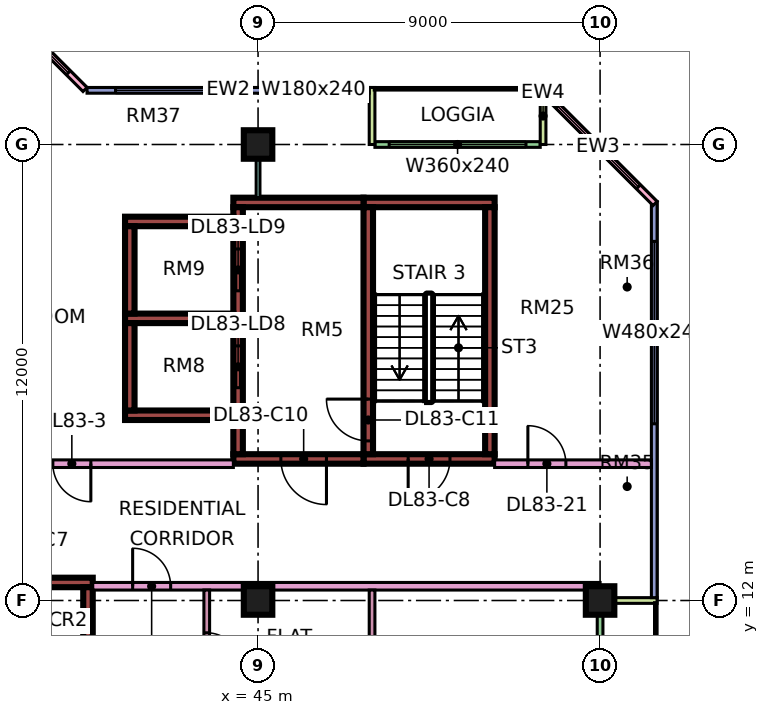
"""IFC4 building model, lengths in metres.
Left out: names, types, materials, properties, quantities, classifications, styles, units other than length and angle.
Written with IfcOpenShell. Run it as: python <this file> out.ifc"""

import sys

from ifc_helpers import new_model, si_unit, direction, frame, frame_2d, origin, origin_2d, place, context, subcontext, project, spatial, rectangle, extrude, element, fill, save


model = new_model("IFC4")
c1 = context("Model", 3, precision=1e-05, world=origin(), true_north=direction((0.0, 1.0)))
c2 = subcontext(c1, "Body", "Model", "MODEL_VIEW")
j1 = project(units=[si_unit("LENGTHUNIT", "METRE"), si_unit("PLANEANGLEUNIT", "RADIAN")], contexts=[c1])
p1 = place(None, origin())
s1 = spatial("IfcSite", under=j1, at=p1, CompositionType="ELEMENT")
p2 = place(p1, origin())
s2 = spatial("IfcBuilding", under=s1, at=p2, CompositionType="ELEMENT")
p3 = place(p2, frame((0.0, 0.0, 357.65)))
s3 = spatial("IfcBuildingStorey", under=s2, at=p3, CompositionType="ELEMENT", Elevation=357.65)
for number, where, z_axis, x_axis in (
    (1, (45.0, 12.0, 0.0), (0.0, 0.0, 1.0), (1.0, 0.0, 0.0)),
    (2, (45.0, 24.0, 0.0), (0.0, 0.0, 1.0), (1.0, 0.0, 0.0)),
    (3, (54.0, 12.0, 0.0), (0.0, 0.0, 1.0), (1.0, 0.0, 0.0)),
):
    element("IfcColumn", number, at=place(p3, frame(where, z_axis=z_axis, x_axis=x_axis)), inside=s3, PredefinedType="COLUMN", context=c2, shape_type="SweptSolid", body=[
        extrude(rectangle(XDim=0.75, YDim=0.75, at=origin_2d()), origin(), (0.0, 0.0, 1.0), 3.75),
    ])
p4 = place(p3, frame((36.375, 12.475, 0.0), z_axis=(0.0, 0.0, 1.0), x_axis=(1.0, 0.0, 0.0)))
e4 = element("IfcWall", 4, at=p4, inside=s3, PredefinedType="SHEAR", context=c2, shape_type="SweptSolid", body=[
    extrude(rectangle(XDim=4.275, YDim=0.25, at=frame_2d((2.137, 0.0))), origin(), (0.0, 0.0, 1.0), 3.75),
])
p5 = place(p4, frame((2.0, 0.0, 0.0)))
e5 = element("IfcOpeningElement", 5, at=p5, cuts=e4, PredefinedType="OPENING", context=c2, shape_type="SweptSolid", body=[
    extrude(rectangle(XDim=1.1, YDim=2.2, at=frame_2d((0.55, 1.1))), frame((0.0, 0.135, 0.0), z_axis=(0.0, -1.0, 0.0), x_axis=(1.0, 0.0, 0.0)), (0.0, 0.0, 1.0), 0.27),
])
p6 = place(p3, frame((40.525, 5.85, 0.0), z_axis=(0.0, 0.0, 1.0), x_axis=(0.0, 1.0, 0.0)))
e6 = element("IfcWall", 6, at=p6, inside=s3, PredefinedType="SHEAR", context=c2, shape_type="SweptSolid", body=[
    extrude(rectangle(XDim=6.5, YDim=0.25, at=frame_2d((3.25, 0.0))), origin(), (0.0, 0.0, 1.0), 3.75),
])
p7 = place(p3, frame((47.775, 15.725, 0.0), z_axis=(0.0, 0.0, 1.0), x_axis=(1.0, 0.0, 0.0)))
e7 = element("IfcWall", 7, at=p7, inside=s3, PredefinedType="SHEAR", context=c2, shape_type="SweptSolid", body=[
    extrude(rectangle(XDim=3.45, YDim=0.25, at=frame_2d((1.725, 0.0))), origin(), (0.0, 0.0, 1.0), 3.75),
])
p8 = place(p7, frame((1.175, 0.0, 0.0)))
e8 = element("IfcOpeningElement", 8, at=p8, cuts=e7, PredefinedType="OPENING", context=c2, shape_type="SweptSolid", body=[
    extrude(rectangle(XDim=1.1, YDim=2.2, at=frame_2d((0.55, 1.1))), frame((0.0, 0.135, 0.0), z_axis=(0.0, -1.0, 0.0), x_axis=(1.0, 0.0, 0.0)), (0.0, 0.0, 1.0), 0.27),
])
p9 = place(p3, frame((47.775, 22.475, 0.0), z_axis=(0.0, 0.0, 1.0), x_axis=(1.0, 0.0, 0.0)))
e9 = element("IfcWall", 9, at=p9, inside=s3, PredefinedType="SHEAR", context=c2, shape_type="SweptSolid", body=[
    extrude(rectangle(XDim=3.45, YDim=0.25, at=frame_2d((1.725, 0.0))), origin(), (0.0, 0.0, 1.0), 3.75),
])
p10 = place(p3, frame((47.9, 15.85, 0.0), z_axis=(0.0, 0.0, 1.0), x_axis=(0.0, 1.0, 0.0)))
e10 = element("IfcWall", 10, at=p10, inside=s3, PredefinedType="SHEAR", context=c2, shape_type="SweptSolid", body=[
    extrude(rectangle(XDim=6.5, YDim=0.25, at=frame_2d((3.25, 0.0))), origin(), (0.0, 0.0, 1.0), 3.75),
])
p11 = place(p10, frame((0.35, 0.0, 0.0)))
e11 = element("IfcOpeningElement", 11, at=p11, cuts=e10, PredefinedType="OPENING", context=c2, shape_type="SweptSolid", body=[
    extrude(rectangle(XDim=1.1, YDim=2.2, at=frame_2d((0.55, 1.1))), frame((0.0, 0.135, 0.0), z_axis=(0.0, -1.0, 0.0), x_axis=(1.0, 0.0, 0.0)), (0.0, 0.0, 1.0), 0.27),
])
p12 = place(p3, frame((51.1, 15.85, 0.0), z_axis=(0.0, 0.0, 1.0), x_axis=(0.0, 1.0, 0.0)))
e12 = element("IfcWall", 12, at=p12, inside=s3, PredefinedType="SHEAR", context=c2, shape_type="SweptSolid", body=[
    extrude(rectangle(XDim=6.5, YDim=0.25, at=frame_2d((3.25, 0.0))), origin(), (0.0, 0.0, 1.0), 3.75),
])
p13 = place(p3, frame((44.35, 15.725, 0.0), z_axis=(0.0, 0.0, 1.0), x_axis=(1.0, 0.0, 0.0)))
e13 = element("IfcWall", 13, at=p13, inside=s3, PredefinedType="SHEAR", context=c2, shape_type="SweptSolid", body=[
    extrude(rectangle(XDim=3.425, YDim=0.25, at=frame_2d((1.712, 0.0))), origin(), (0.0, 0.0, 1.0), 3.75),
])
p14 = place(p13, frame((1.25, 0.0, 0.0)))
e14 = element("IfcOpeningElement", 14, at=p14, cuts=e13, PredefinedType="OPENING", context=c2, shape_type="SweptSolid", body=[
    extrude(rectangle(XDim=1.2, YDim=2.2, at=frame_2d((0.6, 1.1))), frame((0.0, 0.135, 0.0), z_axis=(0.0, -1.0, 0.0), x_axis=(1.0, 0.0, 0.0)), (0.0, 0.0, 1.0), 0.27),
])
p15 = place(p3, frame((44.35, 22.475, 0.0), z_axis=(0.0, 0.0, 1.0), x_axis=(1.0, 0.0, 0.0)))
e15 = element("IfcWall", 15, at=p15, inside=s3, PredefinedType="SHEAR", context=c2, shape_type="SweptSolid", body=[
    extrude(rectangle(XDim=3.425, YDim=0.25, at=frame_2d((1.712, 0.0))), origin(), (0.0, 0.0, 1.0), 3.75),
])
p16 = place(p3, frame((44.475, 15.85, 0.0), z_axis=(0.0, 0.0, 1.0), x_axis=(0.0, 1.0, 0.0)))
e16 = element("IfcWall", 16, at=p16, inside=s3, PredefinedType="SHEAR", context=c2, shape_type="SweptSolid", body=[
    extrude(rectangle(XDim=6.5, YDim=0.25, at=frame_2d((3.25, 0.0))), origin(), (0.0, 0.0, 1.0), 3.75),
])
p17 = place(p16, frame((1.75, 0.0, 0.0)))
e17 = element("IfcOpeningElement", 17, at=p17, cuts=e16, PredefinedType="OPENING", context=c2, shape_type="SweptSolid", body=[
    extrude(rectangle(XDim=1.1, YDim=2.2, at=frame_2d((0.55, 1.1))), frame((0.0, 0.135, 0.0), z_axis=(0.0, -1.0, 0.0), x_axis=(1.0, 0.0, 0.0)), (0.0, 0.0, 1.0), 0.27),
])
p18 = place(p16, frame((4.3, 0.0, 0.0)))
e18 = element("IfcOpeningElement", 18, at=p18, cuts=e16, PredefinedType="OPENING", context=c2, shape_type="SweptSolid", body=[
    extrude(rectangle(XDim=1.1, YDim=2.2, at=frame_2d((0.55, 1.1))), frame((0.0, 0.135, 0.0), z_axis=(0.0, -1.0, 0.0), x_axis=(1.0, 0.0, 0.0)), (0.0, 0.0, 1.0), 0.27),
])
for number, where, z_axis, x_axis in (
    (19, (41.5, 16.875, 0.0), (0.0, 0.0, 1.0), (1.0, 0.0, 0.0)),
    (20, (41.5, 19.425, 0.0), (0.0, 0.0, 1.0), (1.0, 0.0, 0.0)),
    (21, (41.5, 21.975, 0.0), (0.0, 0.0, 1.0), (1.0, 0.0, 0.0)),
):
    element("IfcWall", number, at=place(p3, frame(where, z_axis=z_axis, x_axis=x_axis)), inside=s3, PredefinedType="SHEAR", context=c2, shape_type="SweptSolid", body=[
        extrude(rectangle(XDim=2.85, YDim=0.25, at=frame_2d((1.425, 0.0))), origin(), (0.0, 0.0, 1.0), 3.75),
    ])
for number, where, z_axis, x_axis in (
    (22, (41.625, 17.0, 0.0), (0.0, 0.0, 1.0), (0.0, 1.0, 0.0)),
    (23, (41.625, 19.55, 0.0), (0.0, 0.0, 1.0), (0.0, 1.0, 0.0)),
):
    element("IfcWall", number, at=place(p3, frame(where, z_axis=z_axis, x_axis=x_axis)), inside=s3, PredefinedType="SHEAR", context=c2, shape_type="SweptSolid", body=[
        extrude(rectangle(XDim=2.3, YDim=0.25, at=frame_2d((1.15, 0.0))), origin(), (0.0, 0.0, 1.0), 3.75),
    ])
p19 = place(p3, frame((52.425, 24.0, 0.0), z_axis=(0.0, 0.0, 1.0), x_axis=(-1.0, 0.0, 0.0)))
e24 = element("IfcWall", 24, at=p19, inside=s3, PredefinedType="SOLIDWALL", context=c2, shape_type="SweptSolid", body=[
    extrude(rectangle(XDim=4.35, YDim=0.15, at=frame_2d((2.175, 0.0))), origin(), (0.0, 0.0, 1.0), 3.35),
])
p20 = place(p19, frame((0.375, 0.0, 0.45)))
e25 = element("IfcOpeningElement", 25, at=p20, cuts=e24, PredefinedType="OPENING", context=c2, shape_type="SweptSolid", body=[
    extrude(rectangle(XDim=3.6, YDim=2.4, at=frame_2d((1.8, 1.2))), frame((0.0, 0.085, 0.0), z_axis=(0.0, -1.0, 0.0), x_axis=(1.0, 0.0, 0.0)), (0.0, 0.0, 1.0), 0.17),
])
for number, where, z_axis, x_axis in (
    (26, (52.5, 25.5, 0.0), (0.0, 0.0, 1.0), (0.0, -1.0, 0.0)),
    (27, (48.0, 25.5, 0.0), (0.0, 0.0, 1.0), (0.0, -1.0, 0.0)),
):
    element("IfcWall", number, at=place(p3, frame(where, z_axis=z_axis, x_axis=x_axis)), inside=s3, PredefinedType="SOLIDWALL", context=c2, shape_type="SweptSolid", body=[
        extrude(rectangle(XDim=1.5, YDim=0.15, at=frame_2d((0.75, 0.0))), origin(), (0.0, 0.0, 1.0), 3.35),
    ])
p21 = place(p3, frame((47.925, 25.425, 0.0), z_axis=(0.0, 0.0, 1.0), x_axis=(-1.0, 0.0, 0.0)))
e28 = element("IfcWall", 28, at=p21, inside=s3, PredefinedType="SOLIDWALL", context=c2, shape_type="SweptSolid", body=[
    extrude(rectangle(XDim=7.425, YDim=0.15, at=frame_2d((3.712, 0.0))), origin(), (0.0, 0.0, 1.0), 3.35),
])
p22 = place(p21, frame((0.562, 0.0, 0.45)))
e29 = element("IfcOpeningElement", 29, at=p22, cuts=e28, PredefinedType="OPENING", context=c2, shape_type="SweptSolid", body=[
    extrude(rectangle(XDim=1.8, YDim=2.4, at=frame_2d((0.9, 1.2))), frame((0.0, 0.085, 0.0), z_axis=(0.0, -1.0, 0.0), x_axis=(1.0, 0.0, 0.0)), (0.0, 0.0, 1.0), 0.17),
])
p23 = place(p21, frame((3.675, 0.0, 0.45)))
e30 = element("IfcOpeningElement", 30, at=p23, cuts=e28, PredefinedType="OPENING", context=c2, shape_type="SweptSolid", body=[
    extrude(rectangle(XDim=3.0, YDim=2.4, at=frame_2d((1.5, 1.2))), frame((0.0, 0.085, 0.0), z_axis=(0.0, -1.0, 0.0), x_axis=(1.0, 0.0, 0.0)), (0.0, 0.0, 1.0), 0.17),
])
p24 = place(p3, frame((40.447, 25.447, 0.0), z_axis=(0.0, 0.0, 1.0), x_axis=(-0.707106781187, 0.707106781187, 0.0)))
e31 = element("IfcWall", 31, at=p24, inside=s3, PredefinedType="SOLIDWALL", context=c2, shape_type="SweptSolid", body=[
    extrude(rectangle(XDim=4.243, YDim=0.15, at=frame_2d((2.121, 0.0))), origin(), (0.0, 0.0, 1.0), 3.35),
])
p25 = place(p24, frame((0.621, 0.0, 0.45)))
e32 = element("IfcOpeningElement", 32, at=p25, cuts=e31, PredefinedType="OPENING", context=c2, shape_type="SweptSolid", body=[
    extrude(rectangle(XDim=3.0, YDim=2.4, at=frame_2d((1.5, 1.2))), frame((0.0, 0.085, 0.0), z_axis=(0.0, -1.0, 0.0), x_axis=(1.0, 0.0, 0.0)), (0.0, 0.0, 1.0), 0.17),
])
p26 = place(p3, frame((54.0, 1.575, 0.0), z_axis=(0.0, 0.0, 1.0), x_axis=(0.0, 1.0, 0.0)))
e33 = element("IfcWall", 33, at=p26, inside=s3, PredefinedType="SOLIDWALL", context=c2, shape_type="SweptSolid", body=[
    extrude(rectangle(XDim=10.35, YDim=0.15, at=frame_2d((5.175, 0.0))), origin(), (0.0, 0.0, 1.0), 3.35),
])
p27 = place(p26, frame((0.663, 0.0, 0.0)))
e34 = element("IfcOpeningElement", 34, at=p27, cuts=e33, PredefinedType="OPENING", context=c2, shape_type="SweptSolid", body=[
    extrude(rectangle(XDim=1.8, YDim=2.4, at=frame_2d((0.9, 1.2))), frame((0.0, 0.085, 0.0), z_axis=(0.0, -1.0, 0.0), x_axis=(1.0, 0.0, 0.0)), (0.0, 0.0, 1.0), 0.17),
])
p28 = place(p26, frame((5.637, 0.0, 0.45)))
e35 = element("IfcOpeningElement", 35, at=p28, cuts=e33, PredefinedType="OPENING", context=c2, shape_type="SweptSolid", body=[
    extrude(rectangle(XDim=3.0, YDim=2.4, at=frame_2d((1.5, 1.2))), frame((0.0, 0.085, 0.0), z_axis=(0.0, -1.0, 0.0), x_axis=(1.0, 0.0, 0.0)), (0.0, 0.0, 1.0), 0.17),
])
p29 = place(p3, frame((55.5, 12.0, 0.0), z_axis=(0.0, 0.0, 1.0), x_axis=(-1.0, 0.0, 0.0)))
e36 = element("IfcWall", 36, at=p29, inside=s3, PredefinedType="SOLIDWALL", context=c2, shape_type="SweptSolid", body=[
    extrude(rectangle(XDim=1.5, YDim=0.15, at=frame_2d((0.75, 0.0))), origin(), (0.0, 0.0, 1.0), 3.35),
])
p30 = place(p3, frame((55.425, 12.075, 0.0), z_axis=(0.0, 0.0, 1.0), x_axis=(0.0, 1.0, 0.0)))
e37 = element("IfcWall", 37, at=p30, inside=s3, PredefinedType="SOLIDWALL", context=c2, shape_type="SweptSolid", body=[
    extrude(rectangle(XDim=10.425, YDim=0.15, at=frame_2d((5.212, 0.0))), origin(), (0.0, 0.0, 1.0), 3.35),
])
p31 = place(p30, frame((4.575, 0.0, 0.45)))
e38 = element("IfcOpeningElement", 38, at=p31, cuts=e37, PredefinedType="OPENING", context=c2, shape_type="SweptSolid", body=[
    extrude(rectangle(XDim=4.8, YDim=2.4, at=frame_2d((2.4, 1.2))), frame((0.0, 0.085, 0.0), z_axis=(0.0, -1.0, 0.0), x_axis=(1.0, 0.0, 0.0)), (0.0, 0.0, 1.0), 0.17),
])
p32 = place(p3, frame((55.447, 22.447, 0.0), z_axis=(0.0, 0.0, 1.0), x_axis=(-0.707106781187, 0.707106781187, 0.0)))
e39 = element("IfcWall", 39, at=p32, inside=s3, PredefinedType="SOLIDWALL", context=c2, shape_type="SweptSolid", body=[
    extrude(rectangle(XDim=4.243, YDim=0.15, at=frame_2d((2.121, 0.0))), origin(), (0.0, 0.0, 1.0), 3.35),
])
p33 = place(p32, frame((0.621, 0.0, 0.45)))
e40 = element("IfcOpeningElement", 40, at=p33, cuts=e39, PredefinedType="OPENING", context=c2, shape_type="SweptSolid", body=[
    extrude(rectangle(XDim=3.0, YDim=2.4, at=frame_2d((1.5, 1.2))), frame((0.0, 0.085, 0.0), z_axis=(0.0, -1.0, 0.0), x_axis=(1.0, 0.0, 0.0)), (0.0, 0.0, 1.0), 0.17),
])
p34 = place(p3, frame((34.0, 15.6, 0.0), z_axis=(0.0, 0.0, 1.0), x_axis=(1.0, 0.0, 0.0)))
e41 = element("IfcWall", 41, at=p34, inside=s3, PredefinedType="PARTITIONING", context=c2, shape_type="SweptSolid", body=[
    extrude(rectangle(XDim=10.35, YDim=0.2, at=frame_2d((5.175, 0.0))), origin(), (0.0, 0.0, 1.0), 3.35),
])
p35 = place(p34, frame((5.6, 0.0, 0.0)))
e42 = element("IfcOpeningElement", 42, at=p35, cuts=e41, PredefinedType="OPENING", context=c2, shape_type="SweptSolid", body=[
    extrude(rectangle(XDim=1.0, YDim=2.1, at=frame_2d((0.5, 1.05))), frame((0.0, 0.11, 0.0), z_axis=(0.0, -1.0, 0.0), x_axis=(1.0, 0.0, 0.0)), (0.0, 0.0, 1.0), 0.22),
])
p36 = place(p34, frame((0.45, 0.0, 0.0)))
e43 = element("IfcOpeningElement", 43, at=p36, cuts=e41, PredefinedType="OPENING", context=c2, shape_type="SweptSolid", body=[
    extrude(rectangle(XDim=1.2, YDim=2.1, at=frame_2d((0.6, 1.05))), frame((0.0, 0.11, 0.0), z_axis=(0.0, -1.0, 0.0), x_axis=(1.0, 0.0, 0.0)), (0.0, 0.0, 1.0), 0.22),
])
p37 = place(p3, frame((40.65, 12.375, 0.0), z_axis=(0.0, 0.0, 1.0), x_axis=(1.0, 0.0, 0.0)))
e44 = element("IfcWall", 44, at=p37, inside=s3, PredefinedType="PARTITIONING", context=c2, shape_type="SweptSolid", body=[
    extrude(rectangle(XDim=13.35, YDim=0.2, at=frame_2d((6.675, 0.0))), origin(), (0.0, 0.0, 1.0), 3.35),
])
p38 = place(p37, frame((1.05, 0.0, 0.0)))
e45 = element("IfcOpeningElement", 45, at=p38, cuts=e44, PredefinedType="OPENING", context=c2, shape_type="SweptSolid", body=[
    extrude(rectangle(XDim=1.0, YDim=2.1, at=frame_2d((0.5, 1.05))), frame((0.0, 0.11, 0.0), z_axis=(0.0, -1.0, 0.0), x_axis=(1.0, 0.0, 0.0)), (0.0, 0.0, 1.0), 0.22),
])
p39 = place(p3, frame((43.65, 5.975, 0.0), z_axis=(0.0, 0.0, 1.0), x_axis=(0.0, 1.0, 0.0)))
e46 = element("IfcWall", 46, at=p39, inside=s3, PredefinedType="PARTITIONING", context=c2, shape_type="SweptSolid", body=[
    extrude(rectangle(XDim=6.3, YDim=0.15, at=frame_2d((3.15, 0.0))), origin(), (0.0, 0.0, 1.0), 3.35),
])
p40 = place(p39, frame((4.275, 0.0, 0.0)))
e47 = element("IfcOpeningElement", 47, at=p40, cuts=e46, PredefinedType="OPENING", context=c2, shape_type="SweptSolid", body=[
    extrude(rectangle(XDim=0.9, YDim=2.1, at=frame_2d((0.45, 1.05))), frame((0.0, 0.085, 0.0), z_axis=(0.0, -1.0, 0.0), x_axis=(1.0, 0.0, 0.0)), (0.0, 0.0, 1.0), 0.17),
])
p41 = place(p3, frame((45.0, 22.6, 0.0), z_axis=(0.0, 0.0, 1.0), x_axis=(0.0, 1.0, 0.0)))
e48 = element("IfcWall", 48, at=p41, inside=s3, PredefinedType="PARTITIONING", context=c2, shape_type="SweptSolid", body=[
    extrude(rectangle(XDim=1.4, YDim=0.1, at=frame_2d((0.7, 0.0))), origin(), (0.0, 0.0, 1.0), 3.35),
])
p42 = place(p3, frame((48.0, 5.975, 0.0), z_axis=(0.0, 0.0, 1.0), x_axis=(0.0, 1.0, 0.0)))
e49 = element("IfcWall", 49, at=p42, inside=s3, PredefinedType="PARTITIONING", context=c2, shape_type="SweptSolid", body=[
    extrude(rectangle(XDim=6.3, YDim=0.15, at=frame_2d((3.15, 0.0))), origin(), (0.0, 0.0, 1.0), 3.35),
])
p43 = place(p3, frame((51.225, 15.6, 0.0), z_axis=(0.0, 0.0, 1.0), x_axis=(1.0, 0.0, 0.0)))
e50 = element("IfcWall", 50, at=p43, inside=s3, PredefinedType="PARTITIONING", context=c2, shape_type="SweptSolid", body=[
    extrude(rectangle(XDim=4.125, YDim=0.2, at=frame_2d((2.062, 0.0))), origin(), (0.0, 0.0, 1.0), 3.35),
])
p44 = place(p43, frame((0.875, 0.0, 0.0)))
e51 = element("IfcOpeningElement", 51, at=p44, cuts=e50, PredefinedType="OPENING", context=c2, shape_type="SweptSolid", body=[
    extrude(rectangle(XDim=1.0, YDim=2.1, at=frame_2d((0.5, 1.05))), frame((0.0, 0.11, 0.0), z_axis=(0.0, -1.0, 0.0), x_axis=(1.0, 0.0, 0.0)), (0.0, 0.0, 1.0), 0.22),
])
p45 = place(p20, origin())
e52 = element("IfcWindow", 52, at=p45, inside=s3, PartitioningType="SINGLE_PANEL", PredefinedType="WINDOW", context=c2, shape_type="SweptSolid", body=[
    extrude(rectangle(XDim=3.6, YDim=2.4, at=frame_2d((1.8, 1.2))), frame((0.0, 0.03, 0.0), z_axis=(0.0, -1.0, 0.0), x_axis=(1.0, 0.0, 0.0)), (0.0, 0.0, 1.0), 0.06),
])
fill(e25, e52)
p46 = place(p22, origin())
e53 = element("IfcWindow", 53, at=p46, inside=s3, PartitioningType="SINGLE_PANEL", PredefinedType="WINDOW", context=c2, shape_type="SweptSolid", body=[
    extrude(rectangle(XDim=1.8, YDim=2.4, at=frame_2d((0.9, 1.2))), frame((0.0, 0.03, 0.0), z_axis=(0.0, -1.0, 0.0), x_axis=(1.0, 0.0, 0.0)), (0.0, 0.0, 1.0), 0.06),
])
fill(e29, e53)
p47 = place(p23, origin())
e54 = element("IfcWindow", 54, at=p47, inside=s3, PartitioningType="SINGLE_PANEL", PredefinedType="WINDOW", context=c2, shape_type="SweptSolid", body=[
    extrude(rectangle(XDim=3.0, YDim=2.4, at=frame_2d((1.5, 1.2))), frame((0.0, 0.03, 0.0), z_axis=(0.0, -1.0, 0.0), x_axis=(1.0, 0.0, 0.0)), (0.0, 0.0, 1.0), 0.06),
])
fill(e30, e54)
p48 = place(p25, origin())
e55 = element("IfcWindow", 55, at=p48, inside=s3, PartitioningType="SINGLE_PANEL", PredefinedType="WINDOW", context=c2, shape_type="SweptSolid", body=[
    extrude(rectangle(XDim=3.0, YDim=2.4, at=frame_2d((1.5, 1.2))), frame((0.0, 0.03, 0.0), z_axis=(0.0, -1.0, 0.0), x_axis=(1.0, 0.0, 0.0)), (0.0, 0.0, 1.0), 0.06),
])
fill(e32, e55)
p49 = place(p31, origin())
e56 = element("IfcWindow", 56, at=p49, inside=s3, PartitioningType="SINGLE_PANEL", PredefinedType="WINDOW", context=c2, shape_type="SweptSolid", body=[
    extrude(rectangle(XDim=4.8, YDim=2.4, at=frame_2d((2.4, 1.2))), frame((0.0, 0.03, 0.0), z_axis=(0.0, -1.0, 0.0), x_axis=(1.0, 0.0, 0.0)), (0.0, 0.0, 1.0), 0.06),
])
fill(e38, e56)
p50 = place(p33, origin())
e57 = element("IfcWindow", 57, at=p50, inside=s3, PartitioningType="SINGLE_PANEL", PredefinedType="WINDOW", context=c2, shape_type="SweptSolid", body=[
    extrude(rectangle(XDim=3.0, YDim=2.4, at=frame_2d((1.5, 1.2))), frame((0.0, 0.03, 0.0), z_axis=(0.0, -1.0, 0.0), x_axis=(1.0, 0.0, 0.0)), (0.0, 0.0, 1.0), 0.06),
])
fill(e40, e57)
p51 = place(p8, frame((1.1, 0.0, 0.0), z_axis=(0.0, 0.0, 1.0), x_axis=(-1.0, 0.0, 0.0)))
e58 = element("IfcDoor", 58, at=p51, inside=s3, OperationType="SINGLE_SWING_LEFT", PredefinedType="DOOR", context=c2, shape_type="SweptSolid", body=[
    extrude(rectangle(XDim=1.1, YDim=2.2, at=frame_2d((0.55, 1.1))), frame((0.0, 0.025, 0.0), z_axis=(0.0, -1.0, 0.0), x_axis=(1.0, 0.0, 0.0)), (0.0, 0.0, 1.0), 0.05),
])
fill(e8, e58)
p52 = place(p14, origin())
e59 = element("IfcDoor", 59, at=p52, inside=s3, OperationType="SINGLE_SWING_RIGHT", PredefinedType="DOOR", context=c2, shape_type="SweptSolid", body=[
    extrude(rectangle(XDim=1.2, YDim=2.2, at=frame_2d((0.6, 1.1))), frame((0.0, 0.025, 0.0), z_axis=(0.0, -1.0, 0.0), x_axis=(1.0, 0.0, 0.0)), (0.0, 0.0, 1.0), 0.05),
])
fill(e14, e59)
p53 = place(p11, frame((1.1, 0.0, 0.0), z_axis=(0.0, 0.0, 1.0), x_axis=(-1.0, 0.0, 0.0)))
e60 = element("IfcDoor", 60, at=p53, inside=s3, OperationType="SINGLE_SWING_RIGHT", PredefinedType="DOOR", context=c2, shape_type="SweptSolid", body=[
    extrude(rectangle(XDim=1.1, YDim=2.2, at=frame_2d((0.55, 1.1))), frame((0.0, 0.025, 0.0), z_axis=(0.0, -1.0, 0.0), x_axis=(1.0, 0.0, 0.0)), (0.0, 0.0, 1.0), 0.05),
])
fill(e11, e60)
p54 = place(p17, origin())
e61 = element("IfcDoor", 61, at=p54, inside=s3, OperationType="DOUBLE_DOOR_SLIDING", PredefinedType="DOOR", context=c2, shape_type="SweptSolid", body=[
    extrude(rectangle(XDim=1.1, YDim=2.2, at=frame_2d((0.55, 1.1))), frame((0.0, 0.025, 0.0), z_axis=(0.0, -1.0, 0.0), x_axis=(1.0, 0.0, 0.0)), (0.0, 0.0, 1.0), 0.05),
])
fill(e17, e61)
p55 = place(p18, origin())
e62 = element("IfcDoor", 62, at=p55, inside=s3, OperationType="DOUBLE_DOOR_SLIDING", PredefinedType="DOOR", context=c2, shape_type="SweptSolid", body=[
    extrude(rectangle(XDim=1.1, YDim=2.2, at=frame_2d((0.55, 1.1))), frame((0.0, 0.025, 0.0), z_axis=(0.0, -1.0, 0.0), x_axis=(1.0, 0.0, 0.0)), (0.0, 0.0, 1.0), 0.05),
])
fill(e18, e62)
p56 = place(p35, origin())
e63 = element("IfcDoor", 63, at=p56, inside=s3, OperationType="SINGLE_SWING_RIGHT", PredefinedType="DOOR", context=c2, shape_type="SweptSolid", body=[
    extrude(rectangle(XDim=1.0, YDim=2.1, at=frame_2d((0.5, 1.05))), frame((0.0, 0.025, 0.0), z_axis=(0.0, -1.0, 0.0), x_axis=(1.0, 0.0, 0.0)), (0.0, 0.0, 1.0), 0.05),
])
fill(e42, e63)
p57 = place(p44, origin())
e64 = element("IfcDoor", 64, at=p57, inside=s3, OperationType="SINGLE_SWING_LEFT", PredefinedType="DOOR", context=c2, shape_type="SweptSolid", body=[
    extrude(rectangle(XDim=1.0, YDim=2.1, at=frame_2d((0.5, 1.05))), frame((0.0, 0.025, 0.0), z_axis=(0.0, -1.0, 0.0), x_axis=(1.0, 0.0, 0.0)), (0.0, 0.0, 1.0), 0.05),
])
fill(e51, e64)
p58 = place(p38, origin())
e65 = element("IfcDoor", 65, at=p58, inside=s3, OperationType="SINGLE_SWING_LEFT", PredefinedType="DOOR", context=c2, shape_type="SweptSolid", body=[
    extrude(rectangle(XDim=1.0, YDim=2.1, at=frame_2d((0.5, 1.05))), frame((0.0, 0.025, 0.0), z_axis=(0.0, -1.0, 0.0), x_axis=(1.0, 0.0, 0.0)), (0.0, 0.0, 1.0), 0.05),
])
fill(e45, e65)
p59 = place(p40, frame((0.9, 0.0, 0.0), z_axis=(0.0, 0.0, 1.0), x_axis=(-1.0, 0.0, 0.0)))
e66 = element("IfcDoor", 66, at=p59, inside=s3, OperationType="SINGLE_SWING_LEFT", PredefinedType="DOOR", context=c2, shape_type="SweptSolid", body=[
    extrude(rectangle(XDim=0.9, YDim=2.1, at=frame_2d((0.45, 1.05))), frame((0.0, 0.025, 0.0), z_axis=(0.0, -1.0, 0.0), x_axis=(1.0, 0.0, 0.0)), (0.0, 0.0, 1.0), 0.05),
])
fill(e47, e66)
save(model, sys.argv[1])
